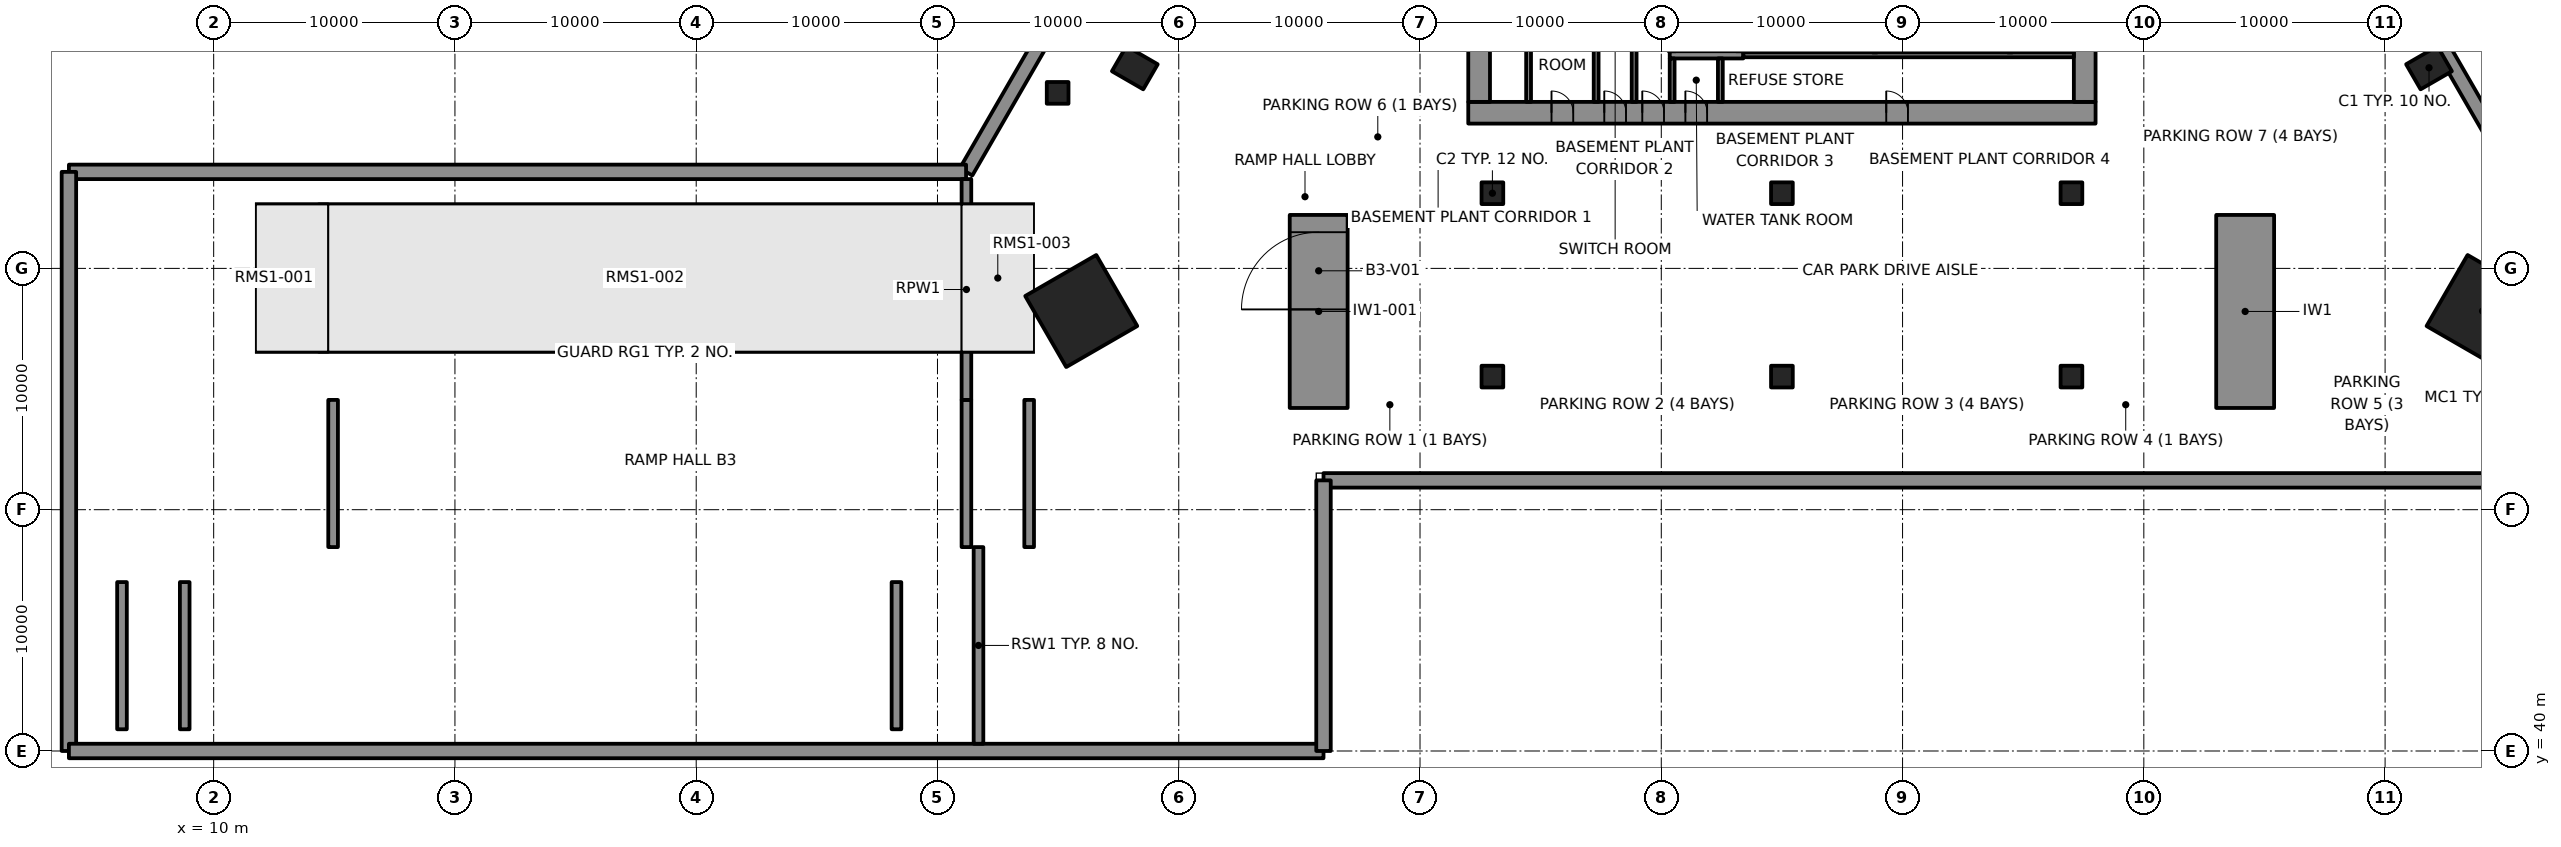
"""IFC4 building model, lengths in metres.
Left out: names, types, materials, properties, quantities, classifications, styles, units other than length and angle.
Written with IfcOpenShell. Run it as: python <this file> out.ifc"""

import sys

from ifc_helpers import new_model, si_unit, direction, frame, frame_2d, origin, origin_2d, place, context, subcontext, project, spatial, polyline, rectangle, outline, extrude, element, fill, save


model = new_model("IFC4")
c1 = context("Model", 3, precision=1e-05, world=origin(), true_north=direction((0.0, 1.0)))
c2 = subcontext(c1, "Body", "Model", "MODEL_VIEW")
j1 = project(units=[si_unit("LENGTHUNIT", "METRE"), si_unit("PLANEANGLEUNIT", "RADIAN")], contexts=[c1])
p1 = place(None, origin())
s1 = spatial("IfcSite", under=j1, at=p1, CompositionType="ELEMENT")
p2 = place(p1, origin())
s2 = spatial("IfcBuilding", under=s1, at=p2, CompositionType="ELEMENT")
p3 = place(p2, frame((0.0, 0.0, -14.0)))
s3 = spatial("IfcBuildingStorey", under=s2, at=p3, CompositionType="ELEMENT", Elevation=-14.0)
p4 = place(p3, frame((56.0, 51.215, -0.35), z_axis=(0.0, 0.0, 1.0), x_axis=(1.0, 0.0, 0.0)))
e1 = element("IfcWall", 1, at=p4, inside=s3, PredefinedType="SOLIDWALL", context=c2, shape_type="SweptSolid", body=[
    extrude(rectangle(XDim=49.532, YDim=0.6, at=frame_2d((24.766, 0.0))), origin(), (0.0, 0.0, 1.0), 4.5),
])
p5 = place(p3, frame((109.132, 57.451, -0.35), z_axis=(0.0, 0.0, 1.0), x_axis=(-0.499999206999, 0.866025861623, 0.0)))
e2 = element("IfcWall", 2, at=p5, inside=s3, PredefinedType="SOLIDWALL", context=c2, shape_type="SweptSolid", body=[
    extrude(rectangle(XDim=61.064, YDim=0.6, at=frame_2d((30.532, 0.0))), origin(), (0.0, 0.0, 1.0), 4.5),
])
p6 = place(p3, frame((67.936, 110.334, -0.35), z_axis=(0.0, 0.0, 1.0), x_axis=(-0.499999089162, -0.866025929656, 0.0)))
e3 = element("IfcWall", 3, at=p6, inside=s3, PredefinedType="SOLIDWALL", context=c2, shape_type="SweptSolid", body=[
    extrude(rectangle(XDim=53.501, YDim=0.6, at=frame_2d((26.751, 0.0))), origin(), (0.0, 0.0, 1.0), 4.5),
])
p7 = place(p3, frame((41.185, 64.0, -0.35), z_axis=(0.0, 0.0, 1.0), x_axis=(-1.0, 0.0, 0.0)))
e4 = element("IfcWall", 4, at=p7, inside=s3, PredefinedType="SOLIDWALL", context=c2, shape_type="SweptSolid", body=[
    extrude(rectangle(XDim=37.185, YDim=0.6, at=frame_2d((18.593, 0.0))), origin(), (0.0, 0.0, 1.0), 4.5),
])
p8 = place(p3, frame((4.0, 64.0, -0.35), z_axis=(0.0, 0.0, 1.0), x_axis=(0.0, -1.0, 0.0)))
e5 = element("IfcWall", 5, at=p8, inside=s3, PredefinedType="SOLIDWALL", context=c2, shape_type="SweptSolid", body=[
    extrude(rectangle(XDim=24.0, YDim=0.6, at=frame_2d((12.0, 0.0))), origin(), (0.0, 0.0, 1.0), 4.5),
])
p9 = place(p3, frame((4.0, 40.0, -0.35), z_axis=(0.0, 0.0, 1.0), x_axis=(1.0, 0.0, 0.0)))
e6 = element("IfcWall", 6, at=p9, inside=s3, PredefinedType="SOLIDWALL", context=c2, shape_type="SweptSolid", body=[
    extrude(rectangle(XDim=52.0, YDim=0.6, at=frame_2d((26.0, 0.0))), origin(), (0.0, 0.0, 1.0), 4.5),
])
p10 = place(p3, frame((56.0, 40.0, -0.35), z_axis=(0.0, 0.0, 1.0), x_axis=(0.0, 1.0, 0.0)))
e7 = element("IfcWall", 7, at=p10, inside=s3, PredefinedType="SOLIDWALL", context=c2, shape_type="SweptSolid", body=[
    extrude(rectangle(XDim=11.215, YDim=0.6, at=frame_2d((5.608, 0.0))), origin(), (0.0, 0.0, 1.0), 4.5),
])
p11 = place(p3, frame((0.0, 0.0, -14.5)))
e8 = element("IfcWall", 8, at=p11, inside=s3, PredefinedType="SOLIDWALL", context=c2, shape_type="SweptSolid", body=[
    extrude(outline(polyline([(56.0, 51.215), (105.532, 51.215), (105.994, 50.415), (56.8, 50.415), (56.0, 51.215)])), origin(), (0.0, 0.0, 1.0), 14.15),
])
e9 = element("IfcWall", 9, at=p11, inside=s3, PredefinedType="SOLIDWALL", context=c2, shape_type="SweptSolid", body=[
    extrude(outline(polyline([(109.132, 57.451), (78.6, 110.334), (79.062, 111.134), (110.056, 57.451), (109.132, 57.451)])), origin(), (0.0, 0.0, 1.0), 14.15),
])
e10 = element("IfcWall", 10, at=p11, inside=s3, PredefinedType="SOLIDWALL", context=c2, shape_type="SweptSolid", body=[
    extrude(outline(polyline([(67.936, 110.334), (41.185, 64.0), (40.723, 64.8), (67.474, 111.134), (67.936, 110.334)])), origin(), (0.0, 0.0, 1.0), 14.15),
])
e11 = element("IfcWall", 11, at=p11, inside=s3, PredefinedType="SOLIDWALL", context=c2, shape_type="SweptSolid", body=[
    extrude(outline(polyline([(41.185, 64.0), (4.0, 64.0), (3.2, 64.8), (40.723, 64.8), (41.185, 64.0)])), origin(), (0.0, 0.0, 1.0), 13.15),
])
e12 = element("IfcWall", 12, at=p11, inside=s3, PredefinedType="SOLIDWALL", context=c2, shape_type="SweptSolid", body=[
    extrude(outline(polyline([(4.0, 64.0), (4.0, 40.0), (3.2, 39.2), (3.2, 64.8), (4.0, 64.0)])), origin(), (0.0, 0.0, 1.0), 13.15),
])
e13 = element("IfcWall", 13, at=p11, inside=s3, PredefinedType="SOLIDWALL", context=c2, shape_type="SweptSolid", body=[
    extrude(outline(polyline([(4.0, 40.0), (56.0, 40.0), (56.8, 39.2), (3.2, 39.2), (4.0, 40.0)])), origin(), (0.0, 0.0, 1.0), 13.15),
])
e14 = element("IfcWall", 14, at=p11, inside=s3, PredefinedType="SOLIDWALL", context=c2, shape_type="SweptSolid", body=[
    extrude(outline(polyline([(56.0, 40.0), (56.0, 51.215), (56.8, 50.415), (56.8, 39.2), (56.0, 40.0)])), origin(), (0.0, 0.0, 1.0), 13.15),
])
p12 = place(p3, frame((55.8, 54.215, -0.35), z_axis=(0.0, 0.0, 1.0), x_axis=(0.0, 1.0, 0.0)))
e15 = element("IfcWall", 15, at=p12, inside=s3, PredefinedType="SHEAR", context=c2, shape_type="SweptSolid", body=[
    extrude(rectangle(XDim=8.0, YDim=2.4, at=frame_2d((4.0, 0.0))), origin(), (0.0, 0.0, 1.0), 4.5),
])
p13 = place(p12, frame((4.085, 0.0, 0.0)))
e16 = element("IfcOpeningElement", 16, at=p13, cuts=e15, PredefinedType="OPENING", context=c2, shape_type="SweptSolid", body=[
    extrude(rectangle(XDim=3.2, YDim=2.6, at=frame_2d((1.6, 1.3))), frame((0.0, 1.21, 0.0), z_axis=(0.0, -1.0, 0.0), x_axis=(1.0, 0.0, 0.0)), (0.0, 0.0, 1.0), 2.42),
])
p14 = place(p3, frame((94.2, 54.215, -0.35), z_axis=(0.0, 0.0, 1.0), x_axis=(0.0, 1.0, 0.0)))
e17 = element("IfcWall", 17, at=p14, inside=s3, PredefinedType="SHEAR", context=c2, shape_type="SweptSolid", body=[
    extrude(rectangle(XDim=8.0, YDim=2.4, at=frame_2d((4.0, 0.0))), origin(), (0.0, 0.0, 1.0), 4.5),
])
for number, where, z_axis, x_axis in (
    (18, (101.821, 68.315, -0.35), (0.0, 0.0, 1.0), (-0.5, 0.866, 0.0)),
    (19, (48.179, 68.315, -0.35), (0.0, 0.0, 1.0), (-0.5, -0.866, 0.0)),
):
    element("IfcColumn", number, at=place(p3, frame(where, z_axis=z_axis, x_axis=x_axis)), inside=s3, PredefinedType="COLUMN", context=c2, shape_type="SweptSolid", body=[
        extrude(rectangle(XDim=1.2, YDim=1.5, at=origin_2d()), origin(), (0.0, 0.0, 1.0), 4.85),
    ])
for number, where, z_axis, x_axis in (
    (20, (63.0, 63.115, -0.35), (0.0, 0.0, 1.0), (1.0, 0.0, 0.0)),
    (21, (75.0, 63.115, -0.35), (0.0, 0.0, 1.0), (1.0, 0.0, 0.0)),
    (22, (87.0, 63.115, -0.35), (0.0, 0.0, 1.0), (1.0, 0.0, 0.0)),
    (23, (63.0, 55.515, -0.35), (0.0, 0.0, 1.0), (1.0, 0.0, 0.0)),
    (24, (75.0, 55.515, -0.35), (0.0, 0.0, 1.0), (1.0, 0.0, 0.0)),
    (25, (87.0, 55.515, -0.35), (0.0, 0.0, 1.0), (1.0, 0.0, 0.0)),
    (26, (44.98, 67.274, -0.35), (0.0, 0.0, 1.0), (1.0, 0.0, 0.0)),
):
    element("IfcColumn", number, at=place(p3, frame(where, z_axis=z_axis, x_axis=x_axis)), inside=s3, PredefinedType="COLUMN", context=c2, shape_type="SweptSolid", body=[
        extrude(rectangle(XDim=0.9, YDim=0.9, at=origin_2d()), origin(), (0.0, 0.0, 1.0), 4.85),
    ])
for number, where, z_axis, x_axis in (
    (27, (104.041, 58.233, -0.35), (0.0, 0.0, 1.0), (0.5, 0.866, 0.0)),
    (28, (45.959, 58.233, -0.35), (0.0, 0.0, 1.0), (0.5, -0.866, 0.0)),
):
    element("IfcColumn", number, at=place(p3, frame(where, z_axis=z_axis, x_axis=x_axis)), inside=s3, PredefinedType="COLUMN", context=c2, shape_type="SweptSolid", body=[
        extrude(rectangle(XDim=3.4, YDim=3.4, at=origin_2d()), origin(), (0.0, 0.0, 1.0), 4.85),
    ])
p15 = place(p3, frame((62.0, 66.45, -0.35), z_axis=(0.0, 0.0, 1.0), x_axis=(1.0, 0.0, 0.0)))
e29 = element("IfcWall", 29, at=p15, inside=s3, PredefinedType="SHEAR", context=c2, shape_type="SweptSolid", body=[
    extrude(rectangle(XDim=26.0, YDim=0.9, at=frame_2d((13.0, 0.0))), origin(), (0.0, 0.0, 1.0), 4.5),
])
p16 = place(p15, frame((3.45, 0.0, 0.35)))
e30 = element("IfcOpeningElement", 30, at=p16, cuts=e29, PredefinedType="OPENING", context=c2, shape_type="SweptSolid", body=[
    extrude(rectangle(XDim=0.9, YDim=2.1, at=frame_2d((0.45, 1.05))), frame((0.0, 0.46, 0.0), z_axis=(0.0, -1.0, 0.0), x_axis=(1.0, 0.0, 0.0)), (0.0, 0.0, 1.0), 0.92),
])
p17 = place(p15, frame((5.637, 0.0, 0.35)))
e31 = element("IfcOpeningElement", 31, at=p17, cuts=e29, PredefinedType="OPENING", context=c2, shape_type="SweptSolid", body=[
    extrude(rectangle(XDim=0.9, YDim=2.1, at=frame_2d((0.45, 1.05))), frame((0.0, 0.46, 0.0), z_axis=(0.0, -1.0, 0.0), x_axis=(1.0, 0.0, 0.0)), (0.0, 0.0, 1.0), 0.92),
])
p18 = place(p15, frame((7.212, 0.0, 0.35)))
e32 = element("IfcOpeningElement", 32, at=p18, cuts=e29, PredefinedType="OPENING", context=c2, shape_type="SweptSolid", body=[
    extrude(rectangle(XDim=0.9, YDim=2.1, at=frame_2d((0.45, 1.05))), frame((0.0, 0.46, 0.0), z_axis=(0.0, -1.0, 0.0), x_axis=(1.0, 0.0, 0.0)), (0.0, 0.0, 1.0), 0.92),
])
p19 = place(p15, frame((8.999, 0.0, 0.35)))
e33 = element("IfcOpeningElement", 33, at=p19, cuts=e29, PredefinedType="OPENING", context=c2, shape_type="SweptSolid", body=[
    extrude(rectangle(XDim=0.9, YDim=2.1, at=frame_2d((0.45, 1.05))), frame((0.0, 0.46, 0.0), z_axis=(0.0, -1.0, 0.0), x_axis=(1.0, 0.0, 0.0)), (0.0, 0.0, 1.0), 0.92),
])
p20 = place(p15, frame((17.324, 0.0, 0.35)))
e34 = element("IfcOpeningElement", 34, at=p20, cuts=e29, PredefinedType="OPENING", context=c2, shape_type="SweptSolid", body=[
    extrude(rectangle(XDim=0.9, YDim=2.1, at=frame_2d((0.45, 1.05))), frame((0.0, 0.46, 0.0), z_axis=(0.0, -1.0, 0.0), x_axis=(1.0, 0.0, 0.0)), (0.0, 0.0, 1.0), 0.92),
])
p21 = place(p3, frame((62.45, 66.9, -0.35), z_axis=(0.0, 0.0, 1.0), x_axis=(0.0, 1.0, 0.0)))
e35 = element("IfcWall", 35, at=p21, inside=s3, PredefinedType="SHEAR", context=c2, shape_type="SweptSolid", body=[
    extrude(rectangle(XDim=16.2, YDim=0.9, at=frame_2d((8.1, 0.0))), origin(), (0.0, 0.0, 1.0), 4.5),
])
p22 = place(p21, frame((5.5, 0.0, 0.35)))
e36 = element("IfcOpeningElement", 36, at=p22, cuts=e35, PredefinedType="OPENING", context=c2, shape_type="SweptSolid", body=[
    extrude(rectangle(XDim=1.8, YDim=2.1, at=frame_2d((0.9, 1.05))), frame((0.0, 0.46, 0.0), z_axis=(0.0, -1.0, 0.0), x_axis=(1.0, 0.0, 0.0)), (0.0, 0.0, 1.0), 0.92),
])
p23 = place(p3, frame((87.55, 66.9, -0.35), z_axis=(0.0, 0.0, 1.0), x_axis=(0.0, 1.0, 0.0)))
e37 = element("IfcWall", 37, at=p23, inside=s3, PredefinedType="SHEAR", context=c2, shape_type="SweptSolid", body=[
    extrude(rectangle(XDim=16.2, YDim=0.9, at=frame_2d((8.1, 0.0))), origin(), (0.0, 0.0, 1.0), 4.5),
])
p24 = place(p23, frame((5.5, 0.0, 0.35)))
e38 = element("IfcOpeningElement", 38, at=p24, cuts=e37, PredefinedType="OPENING", context=c2, shape_type="SweptSolid", body=[
    extrude(rectangle(XDim=1.8, YDim=2.1, at=frame_2d((0.9, 1.05))), frame((0.0, 0.46, 0.0), z_axis=(0.0, -1.0, 0.0), x_axis=(1.0, 0.0, 0.0)), (0.0, 0.0, 1.0), 0.92),
])
p25 = place(p23, frame((2.95, 0.0, 0.35)))
e39 = element("IfcOpeningElement", 39, at=p25, cuts=e37, PredefinedType="OPENING", context=c2, shape_type="SweptSolid", body=[
    extrude(rectangle(XDim=0.9, YDim=2.1, at=frame_2d((0.45, 1.05))), frame((0.0, 0.46, 0.0), z_axis=(0.0, -1.0, 0.0), x_axis=(1.0, 0.0, 0.0)), (0.0, 0.0, 1.0), 0.92),
])
p26 = place(p23, frame((8.95, 0.0, 0.35)))
e40 = element("IfcOpeningElement", 40, at=p26, cuts=e37, PredefinedType="OPENING", context=c2, shape_type="SweptSolid", body=[
    extrude(rectangle(XDim=0.9, YDim=2.1, at=frame_2d((0.45, 1.05))), frame((0.0, 0.46, 0.0), z_axis=(0.0, -1.0, 0.0), x_axis=(1.0, 0.0, 0.0)), (0.0, 0.0, 1.0), 0.92),
])
p27 = place(p23, frame((11.202, 0.0, 0.35)))
e41 = element("IfcOpeningElement", 41, at=p27, cuts=e37, PredefinedType="OPENING", context=c2, shape_type="SweptSolid", body=[
    extrude(rectangle(XDim=0.9, YDim=2.1, at=frame_2d((0.45, 1.05))), frame((0.0, 0.46, 0.0), z_axis=(0.0, -1.0, 0.0), x_axis=(1.0, 0.0, 0.0)), (0.0, 0.0, 1.0), 0.92),
])
p28 = place(p3, frame((70.35, 68.85, -0.35), z_axis=(0.0, 0.0, 1.0), x_axis=(1.0, 0.0, 0.0)))
e42 = element("IfcWall", 42, at=p28, inside=s3, PredefinedType="SHEAR", context=c2, shape_type="SweptSolid", body=[
    extrude(rectangle(XDim=3.05, YDim=0.3, at=frame_2d((1.525, 0.0))), origin(), (0.0, 0.0, 1.0), 4.5),
])
p29 = place(p3, frame((73.4, 68.85, 0.0), z_axis=(0.0, 0.0, 1.0), x_axis=(1.0, 0.0, 0.0)))
e43 = element("IfcWall", 43, at=p29, inside=s3, PredefinedType="PARTITIONING", context=c2, shape_type="SweptSolid", body=[
    extrude(rectangle(XDim=13.7, YDim=0.2, at=frame_2d((6.85, 0.0))), origin(), (0.0, 0.0, 1.0), 4.15),
])
for number, where, z_axis, x_axis in (
    (44, (64.5, 66.9, 0.0), (0.0, 0.0, 1.0), (0.0, 1.0, 0.0)),
    (45, (67.3, 66.9, 0.0), (0.0, 0.0, 1.0), (0.0, 1.0, 0.0)),
    (46, (68.875, 66.9, 0.0), (0.0, 0.0, 1.0), (0.0, 1.0, 0.0)),
):
    element("IfcWall", number, at=place(p3, frame(where, z_axis=z_axis, x_axis=x_axis)), inside=s3, PredefinedType="PARTITIONING", context=c2, shape_type="SweptSolid", body=[
        extrude(rectangle(XDim=4.75, YDim=0.2, at=frame_2d((2.375, 0.0))), origin(), (0.0, 0.0, 1.0), 4.15),
    ])
for number, where, z_axis, x_axis in (
    (47, (70.45, 66.9, 0.0), (0.0, 0.0, 1.0), (0.0, 1.0, 0.0)),
    (48, (72.448, 66.9, 0.0), (0.0, 0.0, 1.0), (0.0, 1.0, 0.0)),
):
    element("IfcWall", number, at=place(p3, frame(where, z_axis=z_axis, x_axis=x_axis)), inside=s3, PredefinedType="PARTITIONING", context=c2, shape_type="SweptSolid", body=[
        extrude(rectangle(XDim=1.8, YDim=0.2, at=frame_2d((0.9, 0.0))), origin(), (0.0, 0.0, 1.0), 4.15),
    ])
for number, where, z_axis, x_axis in (
    (49, (8.8, 40.9, 0.0), (0.0, 0.0, 1.0), (0.0, 1.0, 0.0)),
    (50, (38.3, 40.9, 0.0), (0.0, 0.0, 1.0), (0.0, 1.0, 0.0)),
):
    element("IfcWall", number, at=place(p3, frame(where, z_axis=z_axis, x_axis=x_axis)), inside=s3, PredefinedType="SOLIDWALL", context=c2, shape_type="SweptSolid", body=[
        extrude(rectangle(XDim=6.1, YDim=0.4, at=frame_2d((3.05, 0.0))), origin(), (0.0, 0.0, 1.0), 4.15),
    ])
p30 = place(p3, frame((6.0, 43.95, 0.0), z_axis=(0.0, 0.0, 1.0), x_axis=(1.0, 0.0, 0.0)))
e51 = element("IfcWall", 51, at=p30, inside=s3, PredefinedType="SOLIDWALL", context=c2, shape_type="SweptSolid", body=[
    extrude(rectangle(XDim=0.4, YDim=6.1, at=frame_2d((0.2, 0.0))), origin(), (0.0, 0.0, 1.0), 4.15),
])
for number, where, z_axis, x_axis in (
    (52, (41.2, 48.45, 0.0), (0.0, 0.0, 1.0), (0.0, 1.0, 0.0)),
    (53, (14.95, 48.45, 0.0), (0.0, 0.0, 1.0), (0.0, 1.0, 0.0)),
):
    element("IfcWall", number, at=place(p3, frame(where, z_axis=z_axis, x_axis=x_axis)), inside=s3, PredefinedType="SOLIDWALL", context=c2, shape_type="SweptSolid", body=[
        extrude(rectangle(XDim=6.1, YDim=0.4, at=frame_2d((3.05, 0.0))), origin(), (0.0, 0.0, 1.0), 4.15),
    ])
p31 = place(p3, frame((43.6, 51.5, 0.0), z_axis=(0.0, 0.0, 1.0), x_axis=(1.0, 0.0, 0.0)))
e54 = element("IfcWall", 54, at=p31, inside=s3, PredefinedType="SOLIDWALL", context=c2, shape_type="SweptSolid", body=[
    extrude(rectangle(XDim=0.4, YDim=6.1, at=frame_2d((0.2, 0.0))), origin(), (0.0, 0.0, 1.0), 4.15),
])
p32 = place(p3, frame((14.55, 56.55, 0.0), z_axis=(0.0, 0.0, 1.0), x_axis=(0.0, 1.0, 0.0)))
e55 = element("IfcWall", 55, at=p32, inside=s3, PredefinedType="SOLIDWALL", context=c2, shape_type="SweptSolid", body=[
    extrude(rectangle(XDim=6.1, YDim=0.4, at=frame_2d((3.05, 0.0))), origin(), (0.0, 0.0, 1.0), 3.967),
])
p33 = place(p3, frame((41.7, 40.3, 0.0), z_axis=(0.0, 0.0, 1.0), x_axis=(0.0, 1.0, 0.0)))
e56 = element("IfcWall", 56, at=p33, inside=s3, PredefinedType="SOLIDWALL", context=c2, shape_type="SweptSolid", body=[
    extrude(rectangle(XDim=8.15, YDim=0.4, at=frame_2d((4.075, 0.0))), origin(), (0.0, 0.0, 1.0), 4.15),
])
p34 = place(p3, frame((41.2, 54.55, 0.0), z_axis=(0.0, 0.0, 1.0), x_axis=(0.0, 1.0, 0.0)))
e57 = element("IfcWall", 57, at=p34, inside=s3, PredefinedType="SOLIDWALL", context=c2, shape_type="SweptSolid", body=[
    extrude(rectangle(XDim=9.15, YDim=0.4, at=frame_2d((4.575, 0.0))), origin(), (0.0, 0.0, 1.0), 4.15),
])
p35 = place(p16, origin())
e58 = element("IfcDoor", 58, at=p35, inside=s3, OperationType="SINGLE_SWING_LEFT", PredefinedType="DOOR", context=c2, shape_type="SweptSolid", body=[
    extrude(rectangle(XDim=0.9, YDim=2.1, at=frame_2d((0.45, 1.05))), frame((0.0, 0.17, 0.0), z_axis=(0.0, -1.0, 0.0), x_axis=(1.0, 0.0, 0.0)), (0.0, 0.0, 1.0), 0.34),
])
fill(e30, e58)
p36 = place(p17, origin())
e59 = element("IfcDoor", 59, at=p36, inside=s3, OperationType="SINGLE_SWING_RIGHT", PredefinedType="DOOR", context=c2, shape_type="SweptSolid", body=[
    extrude(rectangle(XDim=0.9, YDim=2.1, at=frame_2d((0.45, 1.05))), frame((0.0, 0.17, 0.0), z_axis=(0.0, -1.0, 0.0), x_axis=(1.0, 0.0, 0.0)), (0.0, 0.0, 1.0), 0.34),
])
fill(e31, e59)
p37 = place(p18, origin())
e60 = element("IfcDoor", 60, at=p37, inside=s3, OperationType="SINGLE_SWING_LEFT", PredefinedType="DOOR", context=c2, shape_type="SweptSolid", body=[
    extrude(rectangle(XDim=0.9, YDim=2.1, at=frame_2d((0.45, 1.05))), frame((0.0, 0.17, 0.0), z_axis=(0.0, -1.0, 0.0), x_axis=(1.0, 0.0, 0.0)), (0.0, 0.0, 1.0), 0.34),
])
fill(e32, e60)
p38 = place(p19, origin())
e61 = element("IfcDoor", 61, at=p38, inside=s3, OperationType="SINGLE_SWING_LEFT", PredefinedType="DOOR", context=c2, shape_type="SweptSolid", body=[
    extrude(rectangle(XDim=0.9, YDim=2.1, at=frame_2d((0.45, 1.05))), frame((0.0, 0.17, 0.0), z_axis=(0.0, -1.0, 0.0), x_axis=(1.0, 0.0, 0.0)), (0.0, 0.0, 1.0), 0.34),
])
fill(e33, e61)
p39 = place(p20, origin())
e62 = element("IfcDoor", 62, at=p39, inside=s3, OperationType="SINGLE_SWING_RIGHT", PredefinedType="DOOR", context=c2, shape_type="SweptSolid", body=[
    extrude(rectangle(XDim=0.9, YDim=2.1, at=frame_2d((0.45, 1.05))), frame((0.0, 0.17, 0.0), z_axis=(0.0, -1.0, 0.0), x_axis=(1.0, 0.0, 0.0)), (0.0, 0.0, 1.0), 0.34),
])
fill(e34, e62)
p40 = place(p13, origin())
e63 = element("IfcDoor", 63, at=p40, inside=s3, OperationType="ROLLINGUP", PredefinedType="GATE", context=c2, shape_type="SweptSolid", body=[
    extrude(rectangle(XDim=3.2, YDim=2.6, at=frame_2d((1.6, 1.3))), frame((0.0, 0.92, 0.0), z_axis=(0.0, -1.0, 0.0), x_axis=(1.0, 0.0, 0.0)), (0.0, 0.0, 1.0), 1.84),
])
fill(e16, e63)
save(model, sys.argv[1])
